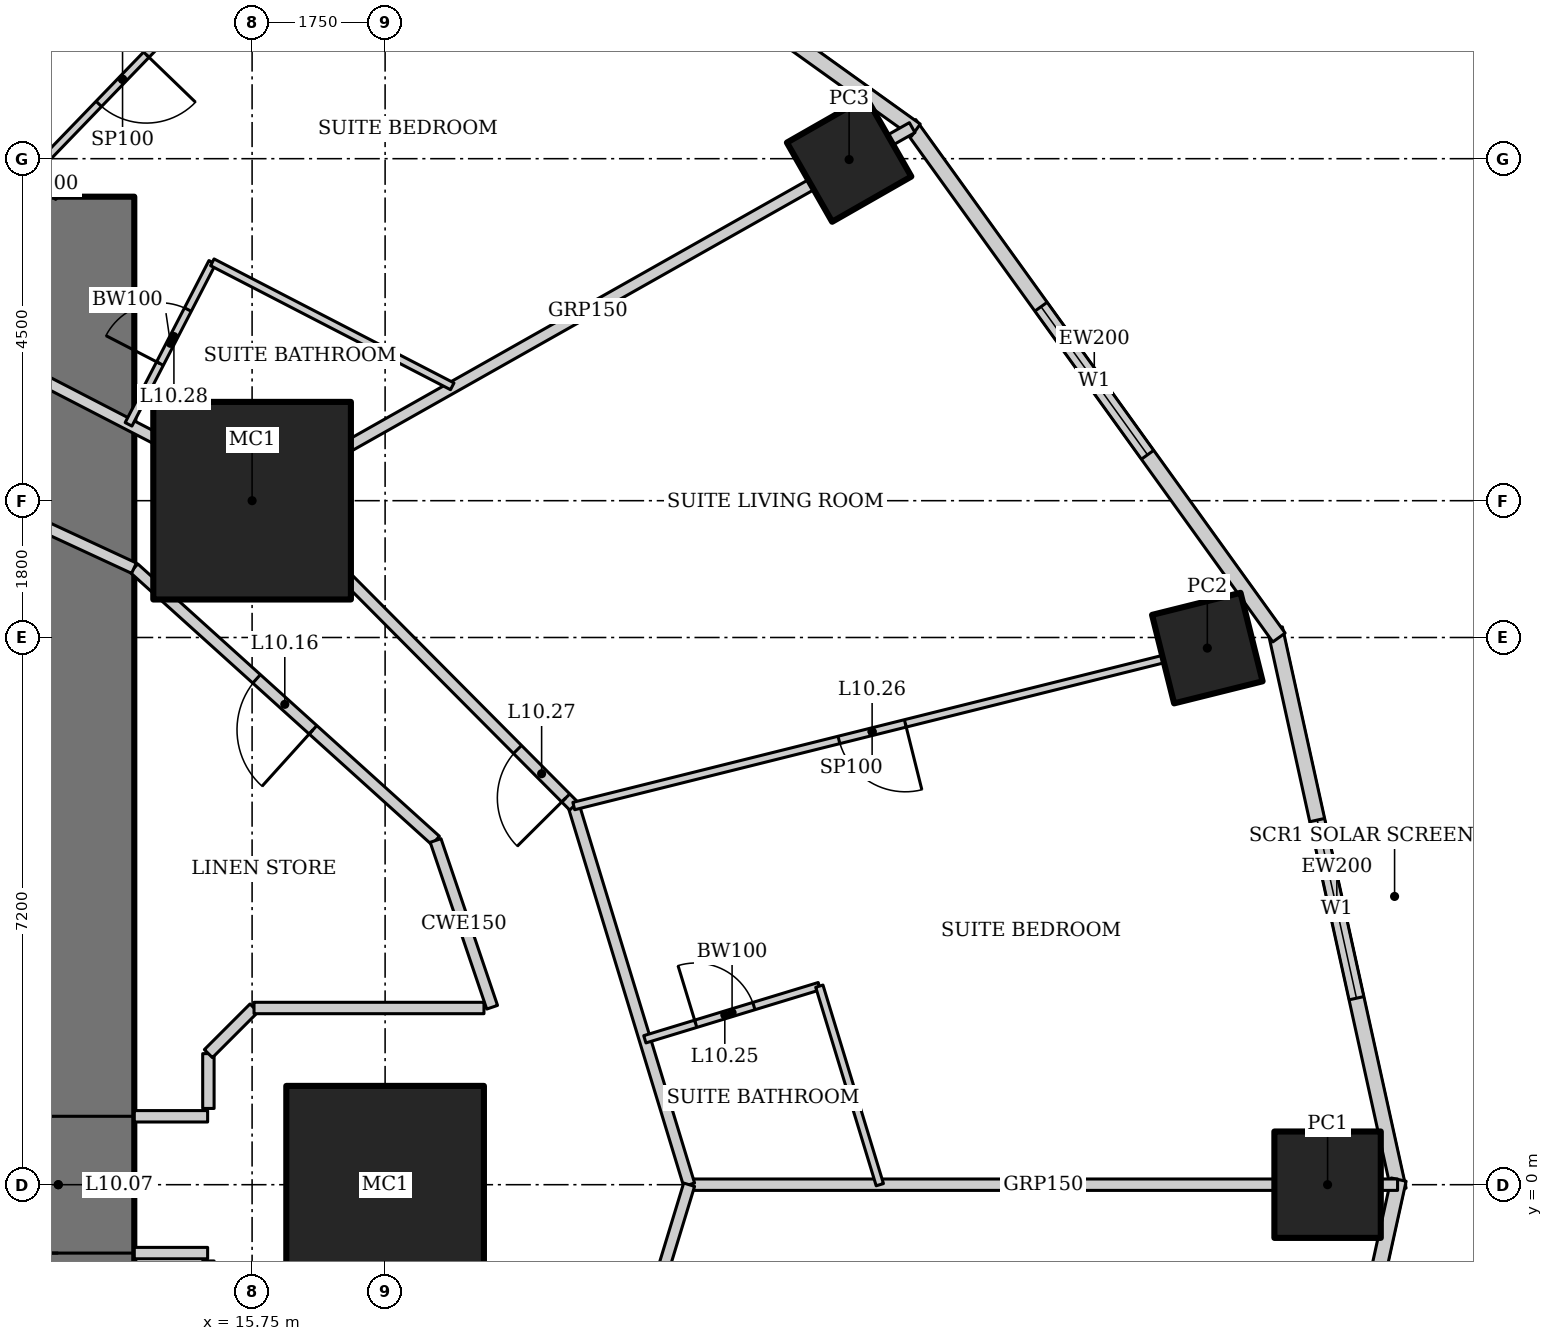
"""IFC4 building model, lengths in metres.
Left out: names, types, materials, properties, quantities, classifications, styles, units other than length and angle.
Written with IfcOpenShell. Run it as: python <this file> out.ifc"""

import sys

from ifc_helpers import new_model, si_unit, direction, frame, frame_2d, origin, origin_2d, place, context, subcontext, project, spatial, rectangle, hollow_rectangle, extrude, element, fill, save


model = new_model("IFC4")
c1 = context("Model", 3, precision=1e-05, world=origin(), true_north=direction((0.0, 1.0)))
c2 = subcontext(c1, "Body", "Model", "MODEL_VIEW")
j1 = project(units=[si_unit("LENGTHUNIT", "METRE"), si_unit("PLANEANGLEUNIT", "RADIAN")], contexts=[c1])
p1 = place(None, origin())
s1 = spatial("IfcSite", under=j1, at=p1, CompositionType="ELEMENT")
p2 = place(p1, origin())
s2 = spatial("IfcBuilding", under=s1, at=p2, CompositionType="ELEMENT")
p3 = place(p2, frame((0.0, 0.0, 51.4)))
s3 = spatial("IfcBuildingStorey", under=s2, at=p3, CompositionType="ELEMENT", Elevation=51.4)
for number, where, z_axis, x_axis in (
    (1, (17.5, 0.0, 0.0), (0.0, 0.0, 1.0), (1.0, 0.0, 0.0)),
    (2, (15.75, 9.0, 0.0), (0.0, 0.0, 1.0), (1.0, 0.0, 0.0)),
):
    element("IfcColumn", number, at=place(p3, frame(where, z_axis=z_axis, x_axis=x_axis)), inside=s3, PredefinedType="COLUMN", context=c2, shape_type="SweptSolid", body=[
        extrude(hollow_rectangle(XDim=2.6, YDim=2.6, WallThickness=0.13, at=origin_2d()), origin(), (0.0, 0.0, 1.0), 3.6),
    ])
p4 = place(p3, frame((29.9, 0.0, 0.0), z_axis=(0.0, 0.0, 1.0), x_axis=(1.0, 0.0, 0.0)))
e3 = element("IfcColumn", 3, at=p4, inside=s3, PredefinedType="COLUMN", context=c2, shape_type="SweptSolid", body=[
    extrude(hollow_rectangle(XDim=1.4, YDim=1.4, WallThickness=0.1, at=origin_2d()), origin(), (0.0, 0.0, 1.0), 3.6),
])
p5 = place(p3, frame((28.318, 7.06, 0.0), z_axis=(0.0, 0.0, 1.0), x_axis=(0.970295726276, 0.2419218956, 0.0)))
e4 = element("IfcColumn", 4, at=p5, inside=s3, PredefinedType="COLUMN", context=c2, shape_type="SweptSolid", body=[
    extrude(hollow_rectangle(XDim=1.2, YDim=1.2, WallThickness=0.1, at=origin_2d()), origin(), (0.0, 0.0, 1.0), 3.6),
])
p6 = place(p3, frame((23.605, 13.489, 0.0), z_axis=(0.0, 0.0, 1.0), x_axis=(0.86824298017, 0.496139221777, 0.0)))
e5 = element("IfcColumn", 5, at=p6, inside=s3, PredefinedType="COLUMN", context=c2, shape_type="SweptSolid", body=[
    extrude(hollow_rectangle(XDim=1.2, YDim=1.2, WallThickness=0.12, at=origin_2d()), origin(), (0.0, 0.0, 1.0), 3.6),
])
p7 = place(p3, frame((13.2, -13.0, 0.0), z_axis=(0.0, 0.0, 1.0), x_axis=(0.0, 1.0, 0.0)))
e6 = element("IfcWall", 6, at=p7, inside=s3, PredefinedType="SHEAR", context=c2, shape_type="SweptSolid", body=[
    extrude(rectangle(XDim=26.0, YDim=2.0, at=frame_2d((13.0, 0.0))), origin(), (0.0, 0.0, 1.0), 3.6),
])
p8 = place(p7, frame((12.1, 0.0, 0.0)))
e7 = element("IfcOpeningElement", 7, at=p8, cuts=e6, PredefinedType="OPENING", context=c2, shape_type="SweptSolid", body=[
    extrude(rectangle(XDim=1.8, YDim=2.1, at=frame_2d((0.9, 1.05))), frame((0.0, 1.01, 0.0), z_axis=(0.0, -1.0, 0.0), x_axis=(1.0, 0.0, 0.0)), (0.0, 0.0, 1.0), 2.02),
])
p9 = place(p3, frame((30.835, -0.067, 0.0), z_axis=(0.0, 0.0, 1.0), x_axis=(-0.215238065514, 0.976561608478, 0.0)))
e8 = element("IfcWall", 8, at=p9, inside=s3, PredefinedType="SOLIDWALL", context=c2, shape_type="SweptSolid", body=[
    extrude(rectangle(XDim=7.562, YDim=0.2, at=frame_2d((3.781, 0.0))), origin(), (0.0, 0.0, 1.0), 3.45),
])
p10 = place(p9, frame((2.581, 0.0, 0.5)))
e9 = element("IfcOpeningElement", 9, at=p10, cuts=e8, PredefinedType="OPENING", context=c2, shape_type="SweptSolid", body=[
    extrude(rectangle(XDim=2.4, YDim=2.2, at=frame_2d((1.2, 1.1))), frame((0.0, 0.11, 0.0), z_axis=(0.0, -1.0, 0.0), x_axis=(1.0, 0.0, 0.0)), (0.0, 0.0, 1.0), 0.22),
])
p11 = place(p3, frame((29.26, 7.2, 0.0), z_axis=(0.0, 0.0, 1.0), x_axis=(-0.583937613703, 0.811798536155, 0.0)))
e10 = element("IfcWall", 10, at=p11, inside=s3, PredefinedType="SOLIDWALL", context=c2, shape_type="SweptSolid", body=[
    extrude(rectangle(XDim=8.323, YDim=0.2, at=frame_2d((4.162, 0.0))), origin(), (0.0, 0.0, 1.0), 3.45),
])
p12 = place(p11, frame((2.961, 0.0, 0.5)))
e11 = element("IfcOpeningElement", 11, at=p12, cuts=e10, PredefinedType="OPENING", context=c2, shape_type="SweptSolid", body=[
    extrude(rectangle(XDim=2.4, YDim=2.2, at=frame_2d((1.2, 1.1))), frame((0.0, 0.11, 0.0), z_axis=(0.0, -1.0, 0.0), x_axis=(1.0, 0.0, 0.0)), (0.0, 0.0, 1.0), 0.22),
])
p13 = place(p3, frame((24.482, 13.875, 0.0), z_axis=(0.0, 0.0, 1.0), x_axis=(-0.812791321576, 0.582554948112, 0.0)))
e12 = element("IfcWall", 12, at=p13, inside=s3, PredefinedType="SOLIDWALL", context=c2, shape_type="SweptSolid", body=[
    extrude(rectangle(XDim=8.063, YDim=0.2, at=frame_2d((4.032, 0.0))), origin(), (0.0, 0.0, 1.0), 3.45),
])
p14 = place(p13, frame((2.832, 0.0, 0.5)))
e13 = element("IfcOpeningElement", 13, at=p14, cuts=e12, PredefinedType="OPENING", context=c2, shape_type="SweptSolid", body=[
    extrude(rectangle(XDim=2.4, YDim=2.2, at=frame_2d((1.2, 1.1))), frame((0.0, 0.11, 0.0), z_axis=(0.0, -1.0, 0.0), x_axis=(1.0, 0.0, 0.0)), (0.0, 0.0, 1.0), 0.22),
])
p15 = place(p3, frame((29.208, -7.318, 0.0), z_axis=(0.0, 0.0, 1.0), x_axis=(0.215238065514, 0.976561608478, 0.0)))
e14 = element("IfcWall", 14, at=p15, inside=s3, PredefinedType="SOLIDWALL", context=c2, shape_type="SweptSolid", body=[
    extrude(rectangle(XDim=7.562, YDim=0.2, at=frame_2d((3.781, 0.0))), origin(), (0.0, 0.0, 1.0), 3.45),
])
p16 = place(p15, frame((2.581, 0.0, 0.5)))
e15 = element("IfcOpeningElement", 15, at=p16, cuts=e14, PredefinedType="OPENING", context=c2, shape_type="SweptSolid", body=[
    extrude(rectangle(XDim=2.4, YDim=2.2, at=frame_2d((1.2, 1.1))), frame((0.0, 0.11, 0.0), z_axis=(0.0, -1.0, 0.0), x_axis=(1.0, 0.0, 0.0)), (0.0, 0.0, 1.0), 0.22),
])
p17 = place(p3, frame((30.821, 0.0, 0.0), z_axis=(0.0, 0.0, 1.0), x_axis=(-1.0, 0.0, 0.0)))
e16 = element("IfcWall", 16, at=p17, inside=s3, PredefinedType="PARTITIONING", context=c2, shape_type="SweptSolid", body=[
    extrude(rectangle(XDim=9.321, YDim=0.15, at=frame_2d((4.66, 0.0))), origin(), (0.0, 0.0, 1.0), 2.528),
])
p18 = place(p3, frame((24.435, 13.909, 0.0), z_axis=(0.0, 0.0, 1.0), x_axis=(-0.870612006791, -0.491970256856, 0.0)))
e17 = element("IfcWall", 17, at=p18, inside=s3, PredefinedType="PARTITIONING", context=c2, shape_type="SweptSolid", body=[
    extrude(rectangle(XDim=9.802, YDim=0.15, at=frame_2d((4.901, 0.0))), origin(), (0.0, 0.0, 1.0), 2.693),
])
p19 = place(p3, frame((21.5, 0.0, 0.0), z_axis=(0.0, 0.0, 1.0), x_axis=(-0.291383581394, 0.95660629754, 0.0)))
e18 = element("IfcWall", 18, at=p19, inside=s3, PredefinedType="PARTITIONING", context=c2, shape_type="SweptSolid", body=[
    extrude(rectangle(XDim=5.208, YDim=0.15, at=frame_2d((2.604, 0.0))), origin(), (0.0, 0.0, 1.0), 3.45),
])
p20 = place(p3, frame((19.982, 4.982, 0.0), z_axis=(0.0, 0.0, 1.0), x_axis=(-0.705121546414, 0.709086457904, 0.0)))
e19 = element("IfcWall", 19, at=p20, inside=s3, PredefinedType="PARTITIONING", context=c2, shape_type="SweptSolid", body=[
    extrude(rectangle(XDim=5.788, YDim=0.15, at=frame_2d((2.894, 0.0))), origin(), (0.0, 0.0, 1.0), 3.45),
])
p21 = place(p20, frame((0.15, 0.0, 0.0)))
e20 = element("IfcOpeningElement", 20, at=p21, cuts=e19, PredefinedType="OPENING", context=c2, shape_type="SweptSolid", body=[
    extrude(rectangle(XDim=0.9, YDim=2.1, at=frame_2d((0.45, 1.05))), frame((0.0, 0.085, 0.0), z_axis=(0.0, -1.0, 0.0), x_axis=(1.0, 0.0, 0.0)), (0.0, 0.0, 1.0), 0.17),
])
p22 = place(p3, frame((15.901, 9.086, 0.0), z_axis=(0.0, 0.0, 1.0), x_axis=(-0.888333171507, 0.459199495209, 0.0)))
e21 = element("IfcWall", 21, at=p22, inside=s3, PredefinedType="PARTITIONING", context=c2, shape_type="SweptSolid", body=[
    extrude(rectangle(XDim=5.351, YDim=0.15, at=frame_2d((2.676, 0.0))), origin(), (0.0, 0.0, 1.0), 3.45),
])
p23 = place(p3, frame((19.982, -4.982, 0.0), z_axis=(0.0, 0.0, 1.0), x_axis=(0.291383581394, 0.95660629754, 0.0)))
e22 = element("IfcWall", 22, at=p23, inside=s3, PredefinedType="PARTITIONING", context=c2, shape_type="SweptSolid", body=[
    extrude(rectangle(XDim=5.208, YDim=0.15, at=frame_2d((2.604, 0.0))), origin(), (0.0, 0.0, 1.0), 3.45),
])
p24 = place(p23, frame((0.15, 0.0, 0.0)))
e23 = element("IfcOpeningElement", 23, at=p24, cuts=e22, PredefinedType="OPENING", context=c2, shape_type="SweptSolid", body=[
    extrude(rectangle(XDim=0.9, YDim=2.1, at=frame_2d((0.45, 1.05))), frame((0.0, 0.085, 0.0), z_axis=(0.0, -1.0, 0.0), x_axis=(1.0, 0.0, 0.0)), (0.0, 0.0, 1.0), 0.17),
])
p25 = place(p3, frame((18.164, 4.529, 0.0), z_axis=(0.0, 0.0, 1.0), x_axis=(-0.742194222, 0.670184852731, 0.0)))
e24 = element("IfcWall", 24, at=p25, inside=s3, PredefinedType="PARTITIONING", context=c2, shape_type="SweptSolid", body=[
    extrude(rectangle(XDim=5.347, YDim=0.15, at=frame_2d((2.673, 0.0))), origin(), (0.0, 0.0, 1.0), 3.45),
])
p26 = place(p25, frame((2.173, 0.0, 0.0)))
e25 = element("IfcOpeningElement", 25, at=p26, cuts=e24, PredefinedType="OPENING", context=c2, shape_type="SweptSolid", body=[
    extrude(rectangle(XDim=1.0, YDim=2.1, at=frame_2d((0.5, 1.05))), frame((0.0, 0.085, 0.0), z_axis=(0.0, -1.0, 0.0), x_axis=(1.0, 0.0, 0.0)), (0.0, 0.0, 1.0), 0.17),
])
p27 = place(p3, frame((14.196, 8.112, 0.0), z_axis=(0.0, 0.0, 1.0), x_axis=(-0.907279653965, 0.420527798727, 0.0)))
e26 = element("IfcWall", 26, at=p27, inside=s3, PredefinedType="PARTITIONING", context=c2, shape_type="SweptSolid", body=[
    extrude(rectangle(XDim=4.844, YDim=0.15, at=frame_2d((2.422, 0.0))), origin(), (0.0, 0.0, 1.0), 3.45),
])
p28 = place(p3, frame((20.917, 1.913, 0.0), z_axis=(0.0, 0.0, 1.0), x_axis=(0.956591303063, 0.291432803411, 0.0)))
e27 = element("IfcWall", 27, at=p28, inside=s3, PredefinedType="PARTITIONING", context=c2, shape_type="SweptSolid", body=[
    extrude(rectangle(XDim=2.4, YDim=0.1, at=frame_2d((1.2, 0.0))), origin(), (0.0, 0.0, 1.0), 3.45),
])
p29 = place(p28, frame((0.7, 0.0, 0.0)))
e28 = element("IfcOpeningElement", 28, at=p29, cuts=e27, PredefinedType="OPENING", context=c2, shape_type="SweptSolid", body=[
    extrude(rectangle(XDim=0.8, YDim=2.1, at=frame_2d((0.4, 1.05))), frame((0.0, 0.06, 0.0), z_axis=(0.0, -1.0, 0.0), x_axis=(1.0, 0.0, 0.0)), (0.0, 0.0, 1.0), 0.12),
])
p30 = place(p3, frame((23.213, 2.613, 0.0), z_axis=(0.0, 0.0, 1.0), x_axis=(0.291339473488, -0.956619731757, 0.0)))
e29 = element("IfcWall", 29, at=p30, inside=s3, PredefinedType="PARTITIONING", context=c2, shape_type="SweptSolid", body=[
    extrude(rectangle(XDim=2.731, YDim=0.1, at=frame_2d((1.365, 0.0))), origin(), (0.0, 0.0, 1.0), 3.45),
])
p31 = place(p3, frame((27.833, 6.939, 0.0), z_axis=(0.0, 0.0, 1.0), x_axis=(-0.97029673161, -0.24191786339, 0.0)))
e30 = element("IfcWall", 30, at=p31, inside=s3, PredefinedType="PARTITIONING", context=c2, shape_type="SweptSolid", body=[
    extrude(rectangle(XDim=8.091, YDim=0.1, at=frame_2d((4.045, 0.0))), origin(), (0.0, 0.0, 1.0), 2.333),
])
p32 = place(p31, frame((3.595, 0.0, 0.0)))
e31 = element("IfcOpeningElement", 31, at=p32, cuts=e30, PredefinedType="OPENING", context=c2, shape_type="SweptSolid", body=[
    extrude(rectangle(XDim=0.9, YDim=2.1, at=frame_2d((0.45, 1.05))), frame((0.0, 0.06, 0.0), z_axis=(0.0, -1.0, 0.0), x_axis=(1.0, 0.0, 0.0)), (0.0, 0.0, 1.0), 0.12),
])
p33 = place(p3, frame((14.125, 10.005, 0.0), z_axis=(0.0, 0.0, 1.0), x_axis=(0.459218106657, 0.888323550582, 0.0)))
e32 = element("IfcWall", 32, at=p33, inside=s3, PredefinedType="PARTITIONING", context=c2, shape_type="SweptSolid", body=[
    extrude(rectangle(XDim=2.4, YDim=0.1, at=frame_2d((1.2, 0.0))), origin(), (0.0, 0.0, 1.0), 3.45),
])
p34 = place(p33, frame((0.9, 0.0, 0.0)))
e33 = element("IfcOpeningElement", 33, at=p34, cuts=e32, PredefinedType="OPENING", context=c2, shape_type="SweptSolid", body=[
    extrude(rectangle(XDim=0.8, YDim=2.1, at=frame_2d((0.4, 1.05))), frame((0.0, 0.06, 0.0), z_axis=(0.0, -1.0, 0.0), x_axis=(1.0, 0.0, 0.0)), (0.0, 0.0, 1.0), 0.12),
])
p35 = place(p3, frame((15.227, 12.137, 0.0), z_axis=(0.0, 0.0, 1.0), x_axis=(0.888342312029, -0.459181812204, 0.0)))
e34 = element("IfcWall", 34, at=p35, inside=s3, PredefinedType="PARTITIONING", context=c2, shape_type="SweptSolid", body=[
    extrude(rectangle(XDim=3.554, YDim=0.1, at=frame_2d((1.777, 0.0))), origin(), (0.0, 0.0, 1.0), 3.45),
])
p36 = place(p3, frame((16.944, 17.545, 0.0), z_axis=(0.0, 0.0, 1.0), x_axis=(-0.694680670522, -0.71931826475, 0.0)))
e35 = element("IfcWall", 35, at=p36, inside=s3, PredefinedType="PARTITIONING", context=c2, shape_type="SweptSolid", body=[
    extrude(rectangle(XDim=8.344, YDim=0.1, at=frame_2d((4.172, 0.0))), origin(), (0.0, 0.0, 1.0), 2.528),
])
p37 = place(p36, frame((3.722, 0.0, 0.0)))
e36 = element("IfcOpeningElement", 36, at=p37, cuts=e35, PredefinedType="OPENING", context=c2, shape_type="SweptSolid", body=[
    extrude(rectangle(XDim=0.9, YDim=2.1, at=frame_2d((0.45, 1.05))), frame((0.0, 0.06, 0.0), z_axis=(0.0, -1.0, 0.0), x_axis=(1.0, 0.0, 0.0)), (0.0, 0.0, 1.0), 0.12),
])
p38 = place(p3, frame((13.2, 13.0, 0.0), z_axis=(0.0, 0.0, 1.0), x_axis=(-0.719347134512, 0.69465077562, 0.0)))
e37 = element("IfcWall", 37, at=p38, inside=s3, PredefinedType="PARTITIONING", context=c2, shape_type="SweptSolid", body=[
    extrude(rectangle(XDim=0.465, YDim=0.1, at=frame_2d((0.232, 0.0))), origin(), (0.0, 0.0, 1.0), 3.45),
])
p39 = place(p3, frame((18.908, 2.335, 0.0), z_axis=(0.0, 0.0, 1.0), x_axis=(-0.321124194945, 0.947037090837, 0.0)))
e38 = element("IfcWall", 38, at=p39, inside=s3, PredefinedType="PARTITIONING", context=c2, shape_type="SweptSolid", body=[
    extrude(rectangle(XDim=2.317, YDim=0.15, at=frame_2d((1.158, 0.0))), origin(), (0.0, 0.0, 1.0), 3.45),
])
for number, where, z_axis, x_axis in (
    (39, (14.2, -0.9, 0.0), (0.0, 0.0, 1.0), (1.0, 0.0, 0.0)),
    (40, (14.2, 0.9, 0.0), (0.0, 0.0, 1.0), (1.0, 0.0, 0.0)),
):
    element("IfcWall", number, at=place(p3, frame(where, z_axis=z_axis, x_axis=x_axis)), inside=s3, PredefinedType="PARTITIONING", context=c2, shape_type="SweptSolid", body=[
        extrude(rectangle(XDim=0.965, YDim=0.15, at=frame_2d((0.482, 0.0))), origin(), (0.0, 0.0, 1.0), 3.45),
    ])
p40 = place(p3, frame((15.175, 1.003, 0.0), z_axis=(0.0, 0.0, 1.0), x_axis=(0.0, 1.0, 0.0)))
e41 = element("IfcWall", 41, at=p40, inside=s3, PredefinedType="PARTITIONING", context=c2, shape_type="SweptSolid", body=[
    extrude(rectangle(XDim=0.721, YDim=0.15, at=frame_2d((0.361, 0.0))), origin(), (0.0, 0.0, 1.0), 3.45),
])
p41 = place(p3, frame((15.175, 1.725, 0.0), z_axis=(0.0, 0.0, 1.0), x_axis=(0.707106781187, 0.707106781187, 0.0)))
e42 = element("IfcWall", 42, at=p41, inside=s3, PredefinedType="PARTITIONING", context=c2, shape_type="SweptSolid", body=[
    extrude(rectangle(XDim=0.849, YDim=0.15, at=frame_2d((0.425, 0.0))), origin(), (0.0, 0.0, 1.0), 3.45),
])
p42 = place(p3, frame((15.775, 2.325, 0.0), z_axis=(0.0, 0.0, 1.0), x_axis=(1.0, 0.0, 0.0)))
e43 = element("IfcWall", 43, at=p42, inside=s3, PredefinedType="PARTITIONING", context=c2, shape_type="SweptSolid", body=[
    extrude(rectangle(XDim=3.025, YDim=0.15, at=frame_2d((1.513, 0.0))), origin(), (0.0, 0.0, 1.0), 3.45),
])
p43 = place(p10, origin())
e44 = element("IfcWindow", 44, at=p43, inside=s3, PartitioningType="SINGLE_PANEL", PredefinedType="WINDOW", context=c2, shape_type="SweptSolid", body=[
    extrude(rectangle(XDim=2.4, YDim=2.2, at=frame_2d((1.2, 1.1))), frame((0.0, 0.03, 0.0), z_axis=(0.0, -1.0, 0.0), x_axis=(1.0, 0.0, 0.0)), (0.0, 0.0, 1.0), 0.06),
])
fill(e9, e44)
p44 = place(p12, origin())
e45 = element("IfcWindow", 45, at=p44, inside=s3, PartitioningType="SINGLE_PANEL", PredefinedType="WINDOW", context=c2, shape_type="SweptSolid", body=[
    extrude(rectangle(XDim=2.4, YDim=2.2, at=frame_2d((1.2, 1.1))), frame((0.0, 0.03, 0.0), z_axis=(0.0, -1.0, 0.0), x_axis=(1.0, 0.0, 0.0)), (0.0, 0.0, 1.0), 0.06),
])
fill(e11, e45)
p45 = place(p8, origin())
e46 = element("IfcDoor", 46, at=p45, inside=s3, OperationType="DOUBLE_DOOR_DOUBLE_SWING", PredefinedType="DOOR", context=c2, shape_type="SweptSolid", body=[
    extrude(rectangle(XDim=1.8, YDim=2.1, at=frame_2d((0.9, 1.05))), frame((0.0, 0.025, 0.0), z_axis=(0.0, -1.0, 0.0), x_axis=(1.0, 0.0, 0.0)), (0.0, 0.0, 1.0), 0.05),
])
fill(e7, e46)
p46 = place(p26, origin())
e47 = element("IfcDoor", 47, at=p46, inside=s3, OperationType="SINGLE_SWING_LEFT", PredefinedType="DOOR", context=c2, shape_type="SweptSolid", body=[
    extrude(rectangle(XDim=1.0, YDim=2.1, at=frame_2d((0.5, 1.05))), frame((0.0, 0.025, 0.0), z_axis=(0.0, -1.0, 0.0), x_axis=(1.0, 0.0, 0.0)), (0.0, 0.0, 1.0), 0.05),
])
fill(e25, e47)
p47 = place(p29, origin())
e48 = element("IfcDoor", 48, at=p47, inside=s3, OperationType="SINGLE_SWING_LEFT", PredefinedType="DOOR", context=c2, shape_type="SweptSolid", body=[
    extrude(rectangle(XDim=0.8, YDim=2.1, at=frame_2d((0.4, 1.05))), frame((0.0, 0.025, 0.0), z_axis=(0.0, -1.0, 0.0), x_axis=(1.0, 0.0, 0.0)), (0.0, 0.0, 1.0), 0.05),
])
fill(e28, e48)
p48 = place(p32, origin())
e49 = element("IfcDoor", 49, at=p48, inside=s3, OperationType="SINGLE_SWING_LEFT", PredefinedType="DOOR", context=c2, shape_type="SweptSolid", body=[
    extrude(rectangle(XDim=0.9, YDim=2.1, at=frame_2d((0.45, 1.05))), frame((0.0, 0.025, 0.0), z_axis=(0.0, -1.0, 0.0), x_axis=(1.0, 0.0, 0.0)), (0.0, 0.0, 1.0), 0.05),
])
fill(e31, e49)
p49 = place(p21, origin())
e50 = element("IfcDoor", 50, at=p49, inside=s3, OperationType="SINGLE_SWING_LEFT", PredefinedType="DOOR", context=c2, shape_type="SweptSolid", body=[
    extrude(rectangle(XDim=0.9, YDim=2.1, at=frame_2d((0.45, 1.05))), frame((0.0, 0.025, 0.0), z_axis=(0.0, -1.0, 0.0), x_axis=(1.0, 0.0, 0.0)), (0.0, 0.0, 1.0), 0.05),
])
fill(e20, e50)
p50 = place(p34, origin())
e51 = element("IfcDoor", 51, at=p50, inside=s3, OperationType="SINGLE_SWING_LEFT", PredefinedType="DOOR", context=c2, shape_type="SweptSolid", body=[
    extrude(rectangle(XDim=0.8, YDim=2.1, at=frame_2d((0.4, 1.05))), frame((0.0, 0.025, 0.0), z_axis=(0.0, -1.0, 0.0), x_axis=(1.0, 0.0, 0.0)), (0.0, 0.0, 1.0), 0.05),
])
fill(e33, e51)
p51 = place(p37, origin())
e52 = element("IfcDoor", 52, at=p51, inside=s3, OperationType="SINGLE_SWING_LEFT", PredefinedType="DOOR", context=c2, shape_type="SweptSolid", body=[
    extrude(rectangle(XDim=0.9, YDim=2.1, at=frame_2d((0.45, 1.05))), frame((0.0, 0.025, 0.0), z_axis=(0.0, -1.0, 0.0), x_axis=(1.0, 0.0, 0.0)), (0.0, 0.0, 1.0), 0.05),
])
fill(e36, e52)
save(model, sys.argv[1])
